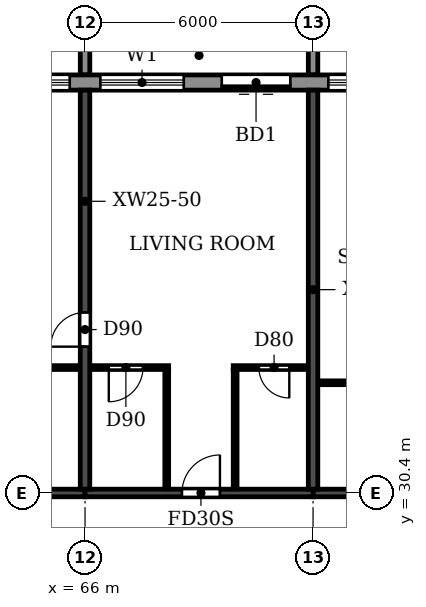
"""IFC4 building model, lengths in metres.
Left out: names, types, materials, properties, quantities, classifications, styles, units other than length and angle.
Written with IfcOpenShell. Run it as: python <this file> out.ifc"""

import sys

from ifc_helpers import new_model, si_unit, direction, frame, frame_2d, origin, place, context, subcontext, project, spatial, polyline, rectangle, outline, extrude, source, transform, mapped, element, fill, save


model = new_model("IFC4")
c1 = context("Model", 3, precision=1e-05, world=origin(), true_north=direction((0.0, 1.0)))
c2 = subcontext(c1, "Body", "Model", "MODEL_VIEW")
j1 = project(units=[si_unit("LENGTHUNIT", "METRE"), si_unit("PLANEANGLEUNIT", "RADIAN")], contexts=[c1])
p1 = place(None, origin())
s1 = spatial("IfcSite", under=j1, at=p1, CompositionType="ELEMENT")
p2 = place(p1, origin())
s2 = spatial("IfcBuilding", under=s1, at=p2, CompositionType="ELEMENT")
p3 = place(p2, frame((0.0, 0.0, 257.7)))
s3 = spatial("IfcBuildingStorey", under=s2, at=p3, CompositionType="ELEMENT", Elevation=257.7)
p4 = place(p3, frame((66.0, 30.5, 0.0), z_axis=(0.0, 0.0, 1.0), x_axis=(0.0, 1.0, 0.0)))
e1 = element("IfcWall", 1, at=p4, inside=s3, PredefinedType="SHEAR", context=c2, shape_type="SweptSolid", body=[
    extrude(rectangle(XDim=10.5, YDim=0.25, at=frame_2d((5.25, 0.0))), origin(), (0.0, 0.0, 1.0), 3.0),
])
p5 = place(p4, frame((3.75, 0.0, 0.0)))
e2 = element("IfcOpeningElement", 2, at=p5, cuts=e1, PredefinedType="OPENING", context=c2, shape_type="SweptSolid", body=[
    extrude(rectangle(XDim=0.9, YDim=2.1, at=frame_2d((0.45, 1.05))), frame((0.0, 0.135, 0.0), z_axis=(0.0, -1.0, 0.0), x_axis=(1.0, 0.0, 0.0)), (0.0, 0.0, 1.0), 0.27),
])
p6 = place(p3, frame((72.0, 30.5, 0.0), z_axis=(0.0, 0.0, 1.0), x_axis=(0.0, 1.0, 0.0)))
e3 = element("IfcWall", 3, at=p6, inside=s3, PredefinedType="SHEAR", context=c2, shape_type="SweptSolid", body=[
    extrude(rectangle(XDim=10.5, YDim=0.25, at=frame_2d((5.25, 0.0))), origin(), (0.0, 0.0, 1.0), 2.1),
])
p7 = place(p3, frame((60.0, 30.4, 0.0), z_axis=(0.0, 0.0, 1.0), x_axis=(1.0, 0.0, 0.0)))
e4 = element("IfcWall", 4, at=p7, inside=s3, PredefinedType="SHEAR", context=c2, shape_type="SweptSolid", body=[
    extrude(rectangle(XDim=6.0, YDim=0.2, at=frame_2d((3.0, 0.0))), origin(), (0.0, 0.0, 1.0), 2.4),
])
p8 = place(p3, frame((66.0, 30.4, 0.0), z_axis=(0.0, 0.0, 1.0), x_axis=(1.0, 0.0, 0.0)))
e5 = element("IfcWall", 5, at=p8, inside=s3, PredefinedType="SHEAR", context=c2, shape_type="SweptSolid", body=[
    extrude(rectangle(XDim=6.0, YDim=0.2, at=frame_2d((3.0, 0.0))), origin(), (0.0, 0.0, 1.0), 2.4),
])
p9 = place(p8, frame((2.55, 0.0, 0.0)))
e6 = element("IfcOpeningElement", 6, at=p9, cuts=e5, PredefinedType="OPENING", context=c2, shape_type="SweptSolid", body=[
    extrude(rectangle(XDim=1.0, YDim=2.1, at=frame_2d((0.5, 1.05))), frame((0.0, 0.11, 0.0), z_axis=(0.0, -1.0, 0.0), x_axis=(1.0, 0.0, 0.0)), (0.0, 0.0, 1.0), 0.22),
])
p10 = place(p3, frame((72.0, 30.4, 0.0), z_axis=(0.0, 0.0, 1.0), x_axis=(1.0, 0.0, 0.0)))
e7 = element("IfcWall", 7, at=p10, inside=s3, PredefinedType="SHEAR", context=c2, shape_type="SweptSolid", body=[
    extrude(rectangle(XDim=6.0, YDim=0.2, at=frame_2d((3.0, 0.0))), origin(), (0.0, 0.0, 1.0), 2.4),
])
p11 = place(p10, frame((2.55, 0.0, 0.0)))
e8 = element("IfcOpeningElement", 8, at=p11, cuts=e7, PredefinedType="OPENING", context=c2, shape_type="SweptSolid", body=[
    extrude(rectangle(XDim=1.0, YDim=2.1, at=frame_2d((0.5, 1.05))), frame((0.0, 0.11, 0.0), z_axis=(0.0, -1.0, 0.0), x_axis=(1.0, 0.0, 0.0)), (0.0, 0.0, 1.0), 0.22),
])
p12 = place(p3, frame((79.317, 41.2, 0.0), z_axis=(0.0, 0.0, 1.0), x_axis=(-1.0, 0.0, 0.0)))
e9 = element("IfcWall", 9, at=p12, inside=s3, PredefinedType="STANDARD", context=c2, shape_type="SweptSolid", body=[
    extrude(rectangle(XDim=56.634, YDim=0.4, at=frame_2d((28.317, 0.0))), origin(), (0.0, 0.0, 1.0), 3.0),
])
p13 = place(p12, frame((52.717, 0.0, 0.9)))
e10 = element("IfcOpeningElement", 10, at=p13, cuts=e9, PredefinedType="OPENING", context=c2, shape_type="SweptSolid", body=[
    extrude(rectangle(XDim=2.2, YDim=1.5, at=frame_2d((1.1, 0.75))), frame((0.0, 0.21, 0.0), z_axis=(0.0, -1.0, 0.0), x_axis=(1.0, 0.0, 0.0)), (0.0, 0.0, 1.0), 0.42),
])
p14 = place(p12, frame((49.717, 0.0, 0.9)))
e11 = element("IfcOpeningElement", 11, at=p14, cuts=e9, PredefinedType="OPENING", context=c2, shape_type="SweptSolid", body=[
    extrude(rectangle(XDim=2.2, YDim=1.5, at=frame_2d((1.1, 0.75))), frame((0.0, 0.21, 0.0), z_axis=(0.0, -1.0, 0.0), x_axis=(1.0, 0.0, 0.0)), (0.0, 0.0, 1.0), 0.42),
])
p15 = place(p12, frame((46.717, 0.0, 0.9)))
e12 = element("IfcOpeningElement", 12, at=p15, cuts=e9, PredefinedType="OPENING", context=c2, shape_type="SweptSolid", body=[
    extrude(rectangle(XDim=2.2, YDim=1.5, at=frame_2d((1.1, 0.75))), frame((0.0, 0.21, 0.0), z_axis=(0.0, -1.0, 0.0), x_axis=(1.0, 0.0, 0.0)), (0.0, 0.0, 1.0), 0.42),
])
p16 = place(p12, frame((43.917, 0.0, 0.0)))
e13 = element("IfcOpeningElement", 13, at=p16, cuts=e9, PredefinedType="OPENING", context=c2, shape_type="SweptSolid", body=[
    extrude(rectangle(XDim=1.8, YDim=2.4, at=frame_2d((0.9, 1.2))), frame((0.0, 0.21, 0.0), z_axis=(0.0, -1.0, 0.0), x_axis=(1.0, 0.0, 0.0)), (0.0, 0.0, 1.0), 0.42),
])
p17 = place(p12, frame((40.717, 0.0, 0.9)))
e14 = element("IfcOpeningElement", 14, at=p17, cuts=e9, PredefinedType="OPENING", context=c2, shape_type="SweptSolid", body=[
    extrude(rectangle(XDim=2.2, YDim=1.5, at=frame_2d((1.1, 0.75))), frame((0.0, 0.21, 0.0), z_axis=(0.0, -1.0, 0.0), x_axis=(1.0, 0.0, 0.0)), (0.0, 0.0, 1.0), 0.42),
])
p18 = place(p12, frame((37.917, 0.0, 0.0)))
e15 = element("IfcOpeningElement", 15, at=p18, cuts=e9, PredefinedType="OPENING", context=c2, shape_type="SweptSolid", body=[
    extrude(rectangle(XDim=1.8, YDim=2.4, at=frame_2d((0.9, 1.2))), frame((0.0, 0.21, 0.0), z_axis=(0.0, -1.0, 0.0), x_axis=(1.0, 0.0, 0.0)), (0.0, 0.0, 1.0), 0.42),
])
p19 = place(p12, frame((34.717, 0.0, 0.9)))
e16 = element("IfcOpeningElement", 16, at=p19, cuts=e9, PredefinedType="OPENING", context=c2, shape_type="SweptSolid", body=[
    extrude(rectangle(XDim=2.2, YDim=1.5, at=frame_2d((1.1, 0.75))), frame((0.0, 0.21, 0.0), z_axis=(0.0, -1.0, 0.0), x_axis=(1.0, 0.0, 0.0)), (0.0, 0.0, 1.0), 0.42),
])
p20 = place(p12, frame((31.717, 0.0, 0.9)))
e17 = element("IfcOpeningElement", 17, at=p20, cuts=e9, PredefinedType="OPENING", context=c2, shape_type="SweptSolid", body=[
    extrude(rectangle(XDim=2.2, YDim=1.5, at=frame_2d((1.1, 0.75))), frame((0.0, 0.21, 0.0), z_axis=(0.0, -1.0, 0.0), x_axis=(1.0, 0.0, 0.0)), (0.0, 0.0, 1.0), 0.42),
])
p21 = place(p12, frame((28.717, 0.0, 0.9)))
e18 = element("IfcOpeningElement", 18, at=p21, cuts=e9, PredefinedType="OPENING", context=c2, shape_type="SweptSolid", body=[
    extrude(rectangle(XDim=2.2, YDim=1.5, at=frame_2d((1.1, 0.75))), frame((0.0, 0.21, 0.0), z_axis=(0.0, -1.0, 0.0), x_axis=(1.0, 0.0, 0.0)), (0.0, 0.0, 1.0), 0.42),
])
p22 = place(p12, frame((25.917, 0.0, 0.0)))
e19 = element("IfcOpeningElement", 19, at=p22, cuts=e9, PredefinedType="OPENING", context=c2, shape_type="SweptSolid", body=[
    extrude(rectangle(XDim=1.8, YDim=2.4, at=frame_2d((0.9, 1.2))), frame((0.0, 0.21, 0.0), z_axis=(0.0, -1.0, 0.0), x_axis=(1.0, 0.0, 0.0)), (0.0, 0.0, 1.0), 0.42),
])
p23 = place(p12, frame((22.917, 0.0, 0.0)))
e20 = element("IfcOpeningElement", 20, at=p23, cuts=e9, PredefinedType="OPENING", context=c2, shape_type="SweptSolid", body=[
    extrude(rectangle(XDim=1.8, YDim=2.4, at=frame_2d((0.9, 1.2))), frame((0.0, 0.21, 0.0), z_axis=(0.0, -1.0, 0.0), x_axis=(1.0, 0.0, 0.0)), (0.0, 0.0, 1.0), 0.42),
])
p24 = place(p12, frame((19.717, 0.0, 0.9)))
e21 = element("IfcOpeningElement", 21, at=p24, cuts=e9, PredefinedType="OPENING", context=c2, shape_type="SweptSolid", body=[
    extrude(rectangle(XDim=2.2, YDim=1.5, at=frame_2d((1.1, 0.75))), frame((0.0, 0.21, 0.0), z_axis=(0.0, -1.0, 0.0), x_axis=(1.0, 0.0, 0.0)), (0.0, 0.0, 1.0), 0.42),
])
p25 = place(p12, frame((16.717, 0.0, 0.9)))
e22 = element("IfcOpeningElement", 22, at=p25, cuts=e9, PredefinedType="OPENING", context=c2, shape_type="SweptSolid", body=[
    extrude(rectangle(XDim=2.2, YDim=1.5, at=frame_2d((1.1, 0.75))), frame((0.0, 0.21, 0.0), z_axis=(0.0, -1.0, 0.0), x_axis=(1.0, 0.0, 0.0)), (0.0, 0.0, 1.0), 0.42),
])
p26 = place(p12, frame((13.717, 0.0, 0.9)))
e23 = element("IfcOpeningElement", 23, at=p26, cuts=e9, PredefinedType="OPENING", context=c2, shape_type="SweptSolid", body=[
    extrude(rectangle(XDim=2.2, YDim=1.5, at=frame_2d((1.1, 0.75))), frame((0.0, 0.21, 0.0), z_axis=(0.0, -1.0, 0.0), x_axis=(1.0, 0.0, 0.0)), (0.0, 0.0, 1.0), 0.42),
])
p27 = place(p12, frame((10.717, 0.0, 0.9)))
e24 = element("IfcOpeningElement", 24, at=p27, cuts=e9, PredefinedType="OPENING", context=c2, shape_type="SweptSolid", body=[
    extrude(rectangle(XDim=2.2, YDim=1.5, at=frame_2d((1.1, 0.75))), frame((0.0, 0.21, 0.0), z_axis=(0.0, -1.0, 0.0), x_axis=(1.0, 0.0, 0.0)), (0.0, 0.0, 1.0), 0.42),
])
p28 = place(p12, frame((7.917, 0.0, 0.0)))
e25 = element("IfcOpeningElement", 25, at=p28, cuts=e9, PredefinedType="OPENING", context=c2, shape_type="SweptSolid", body=[
    extrude(rectangle(XDim=1.8, YDim=2.4, at=frame_2d((0.9, 1.2))), frame((0.0, 0.21, 0.0), z_axis=(0.0, -1.0, 0.0), x_axis=(1.0, 0.0, 0.0)), (0.0, 0.0, 1.0), 0.42),
])
p29 = place(p12, frame((4.717, 0.0, 0.9)))
e26 = element("IfcOpeningElement", 26, at=p29, cuts=e9, PredefinedType="OPENING", context=c2, shape_type="SweptSolid", body=[
    extrude(rectangle(XDim=2.2, YDim=1.5, at=frame_2d((1.1, 0.75))), frame((0.0, 0.21, 0.0), z_axis=(0.0, -1.0, 0.0), x_axis=(1.0, 0.0, 0.0)), (0.0, 0.0, 1.0), 0.42),
])
p30 = place(p12, frame((1.917, 0.0, 0.0)))
e27 = element("IfcOpeningElement", 27, at=p30, cuts=e9, PredefinedType="OPENING", context=c2, shape_type="SweptSolid", body=[
    extrude(rectangle(XDim=1.8, YDim=2.4, at=frame_2d((0.9, 1.2))), frame((0.0, 0.21, 0.0), z_axis=(0.0, -1.0, 0.0), x_axis=(1.0, 0.0, 0.0)), (0.0, 0.0, 1.0), 0.42),
])
m1 = source(origin(), c2, "Body", "SweptSolid", [
    extrude(outline(polyline([(0.0, 0.0), (0.25, 0.0), (0.25, 3.1), (0.0, 3.1), (0.0, 0.0)])), origin(), (0.0, 0.0, 1.0), 3.1),
])
p31 = place(p3, frame((65.875, 41.4, 0.0)))
e28 = element("IfcWall", 28, at=p31, inside=s3, PredefinedType="STANDARD", context=c2, shape_type="MappedRepresentation", body=[
    mapped(m1, transform((0.0, 0.0, 0.0))),
])
m2 = source(origin(), c2, "Body", "SweptSolid", [
    extrude(outline(polyline([(0.0, 0.0), (0.25, 0.0), (0.25, 3.1), (0.0, 3.1), (0.0, 0.0)])), origin(), (0.0, 0.0, 1.0), 2.1),
])
p32 = place(p3, frame((71.875, 41.4, 0.0)))
e29 = element("IfcWall", 29, at=p32, inside=s3, PredefinedType="STANDARD", context=c2, shape_type="MappedRepresentation", body=[
    mapped(m2, transform((0.0, 0.0, 0.0))),
])
p33 = place(p3, frame((72.135, 33.3, 0.0), z_axis=(0.0, 0.0, 1.0), x_axis=(1.0, 0.0, 0.0)))
e30 = element("IfcWall", 30, at=p33, inside=s3, PredefinedType="PARTITIONING", context=c2, shape_type="SweptSolid", body=[
    extrude(rectangle(XDim=2.065, YDim=0.1, at=frame_2d((1.032, 0.0))), origin(), (0.0, 0.0, 1.0), 3.0),
])
p34 = place(p3, frame((62.9, 33.7, 0.0), z_axis=(0.0, 0.0, 1.0), x_axis=(1.0, 0.0, 0.0)))
e31 = element("IfcWall", 31, at=p34, inside=s3, PredefinedType="PARTITIONING", context=c2, shape_type="SweptSolid", body=[
    extrude(rectangle(XDim=2.965, YDim=0.1, at=frame_2d((1.482, 0.0))), origin(), (0.0, 0.0, 1.0), 3.0),
])
p35 = place(p34, frame((1.2, 0.0, 0.0)))
e32 = element("IfcOpeningElement", 32, at=p35, cuts=e31, PredefinedType="OPENING", context=c2, shape_type="SweptSolid", body=[
    extrude(rectangle(XDim=0.8, YDim=2.1, at=frame_2d((0.4, 1.05))), frame((0.0, 0.06, 0.0), z_axis=(0.0, -1.0, 0.0), x_axis=(1.0, 0.0, 0.0)), (0.0, 0.0, 1.0), 0.12),
])
p36 = place(p3, frame((66.135, 33.7, 0.0), z_axis=(0.0, 0.0, 1.0), x_axis=(1.0, 0.0, 0.0)))
e33 = element("IfcWall", 33, at=p36, inside=s3, PredefinedType="PARTITIONING", context=c2, shape_type="SweptSolid", body=[
    extrude(rectangle(XDim=2.065, YDim=0.1, at=frame_2d((1.032, 0.0))), origin(), (0.0, 0.0, 1.0), 3.0),
])
p37 = place(p36, frame((0.49, 0.0, 0.0)))
e34 = element("IfcOpeningElement", 34, at=p37, cuts=e33, PredefinedType="OPENING", context=c2, shape_type="SweptSolid", body=[
    extrude(rectangle(XDim=0.9, YDim=2.1, at=frame_2d((0.45, 1.05))), frame((0.0, 0.06, 0.0), z_axis=(0.0, -1.0, 0.0), x_axis=(1.0, 0.0, 0.0)), (0.0, 0.0, 1.0), 0.12),
])
p38 = place(p3, frame((69.9, 33.7, 0.0), z_axis=(0.0, 0.0, 1.0), x_axis=(1.0, 0.0, 0.0)))
e35 = element("IfcWall", 35, at=p38, inside=s3, PredefinedType="PARTITIONING", context=c2, shape_type="SweptSolid", body=[
    extrude(rectangle(XDim=1.965, YDim=0.1, at=frame_2d((0.982, 0.0))), origin(), (0.0, 0.0, 1.0), 3.0),
])
p39 = place(p38, frame((0.675, 0.0, 0.0)))
e36 = element("IfcOpeningElement", 36, at=p39, cuts=e35, PredefinedType="OPENING", context=c2, shape_type="SweptSolid", body=[
    extrude(rectangle(XDim=0.8, YDim=2.1, at=frame_2d((0.4, 1.05))), frame((0.0, 0.06, 0.0), z_axis=(0.0, -1.0, 0.0), x_axis=(1.0, 0.0, 0.0)), (0.0, 0.0, 1.0), 0.12),
])
for number, where, z_axis, x_axis in (
    (37, (68.15, 30.51, 0.0), (0.0, 0.0, 1.0), (0.0, 1.0, 0.0)),
    (38, (69.95, 30.51, 0.0), (0.0, 0.0, 1.0), (0.0, 1.0, 0.0)),
):
    element("IfcWall", number, at=place(p3, frame(where, z_axis=z_axis, x_axis=x_axis)), inside=s3, PredefinedType="PARTITIONING", context=c2, shape_type="SweptSolid", body=[
        extrude(rectangle(XDim=3.14, YDim=0.1, at=frame_2d((1.57, 0.0))), origin(), (0.0, 0.0, 1.0), 3.0),
    ])
p40 = place(p26, origin())
e39 = element("IfcWindow", 39, at=p40, inside=s3, PartitioningType="DOUBLE_PANEL_HORIZONTAL", PredefinedType="WINDOW", context=c2, shape_type="SweptSolid", body=[
    extrude(rectangle(XDim=2.2, YDim=1.5, at=frame_2d((1.1, 0.75))), frame((0.0, 0.03, 0.0), z_axis=(0.0, -1.0, 0.0), x_axis=(1.0, 0.0, 0.0)), (0.0, 0.0, 1.0), 0.06),
])
fill(e23, e39)
p41 = place(p27, origin())
e40 = element("IfcWindow", 40, at=p41, inside=s3, PartitioningType="DOUBLE_PANEL_HORIZONTAL", PredefinedType="WINDOW", context=c2, shape_type="SweptSolid", body=[
    extrude(rectangle(XDim=2.2, YDim=1.5, at=frame_2d((1.1, 0.75))), frame((0.0, 0.03, 0.0), z_axis=(0.0, -1.0, 0.0), x_axis=(1.0, 0.0, 0.0)), (0.0, 0.0, 1.0), 0.06),
])
fill(e24, e40)
p42 = place(p28, origin())
e41 = element("IfcDoor", 41, at=p42, inside=s3, OperationType="DOUBLE_DOOR_SLIDING", PredefinedType="DOOR", context=c2, shape_type="SweptSolid", body=[
    extrude(rectangle(XDim=1.8, YDim=2.4, at=frame_2d((0.9, 1.2))), frame((0.0, 0.025, 0.0), z_axis=(0.0, -1.0, 0.0), x_axis=(1.0, 0.0, 0.0)), (0.0, 0.0, 1.0), 0.05),
])
fill(e25, e41)
p43 = place(p29, origin())
e42 = element("IfcWindow", 42, at=p43, inside=s3, PartitioningType="DOUBLE_PANEL_HORIZONTAL", PredefinedType="WINDOW", context=c2, shape_type="SweptSolid", body=[
    extrude(rectangle(XDim=2.2, YDim=1.5, at=frame_2d((1.1, 0.75))), frame((0.0, 0.03, 0.0), z_axis=(0.0, -1.0, 0.0), x_axis=(1.0, 0.0, 0.0)), (0.0, 0.0, 1.0), 0.06),
])
fill(e26, e42)
p44 = place(p5, origin())
e43 = element("IfcDoor", 43, at=p44, inside=s3, OperationType="SINGLE_SWING_LEFT", PredefinedType="DOOR", context=c2, shape_type="SweptSolid", body=[
    extrude(rectangle(XDim=0.9, YDim=2.1, at=frame_2d((0.45, 1.05))), frame((0.0, 0.025, 0.0), z_axis=(0.0, -1.0, 0.0), x_axis=(1.0, 0.0, 0.0)), (0.0, 0.0, 1.0), 0.05),
])
fill(e2, e43)
p45 = place(p37, frame((0.9, 0.0, 0.0), z_axis=(0.0, 0.0, 1.0), x_axis=(-1.0, 0.0, 0.0)))
e44 = element("IfcDoor", 44, at=p45, inside=s3, OperationType="SINGLE_SWING_RIGHT", PredefinedType="DOOR", context=c2, shape_type="SweptSolid", body=[
    extrude(rectangle(XDim=0.9, YDim=2.1, at=frame_2d((0.45, 1.05))), frame((0.0, 0.025, 0.0), z_axis=(0.0, -1.0, 0.0), x_axis=(1.0, 0.0, 0.0)), (0.0, 0.0, 1.0), 0.05),
])
fill(e34, e44)
p46 = place(p9, origin())
e45 = element("IfcDoor", 45, at=p46, inside=s3, OperationType="SINGLE_SWING_RIGHT", PredefinedType="DOOR", context=c2, shape_type="SweptSolid", body=[
    extrude(rectangle(XDim=1.0, YDim=2.1, at=frame_2d((0.5, 1.05))), frame((0.0, 0.025, 0.0), z_axis=(0.0, -1.0, 0.0), x_axis=(1.0, 0.0, 0.0)), (0.0, 0.0, 1.0), 0.05),
])
fill(e6, e45)
p47 = place(p39, frame((0.8, 0.0, 0.0), z_axis=(0.0, 0.0, 1.0), x_axis=(-1.0, 0.0, 0.0)))
e46 = element("IfcDoor", 46, at=p47, inside=s3, OperationType="SINGLE_SWING_LEFT", PredefinedType="DOOR", context=c2, shape_type="SweptSolid", body=[
    extrude(rectangle(XDim=0.8, YDim=2.1, at=frame_2d((0.4, 1.05))), frame((0.0, 0.025, 0.0), z_axis=(0.0, -1.0, 0.0), x_axis=(1.0, 0.0, 0.0)), (0.0, 0.0, 1.0), 0.05),
])
fill(e36, e46)
save(model, sys.argv[1])
